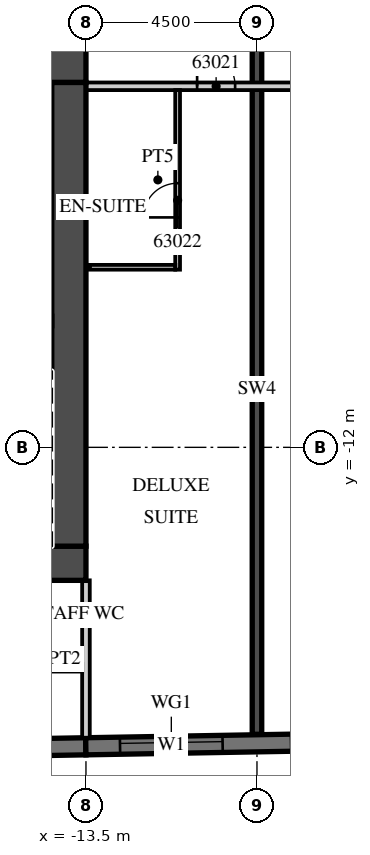
"""IFC4 building model, lengths in metres.
Left out: names, types, materials, properties, quantities, classifications, styles, units other than length and angle.
Written with IfcOpenShell. Run it as: python <this file> out.ifc"""

import sys

from ifc_helpers import new_model, si_unit, direction, frame, frame_2d, origin, place, context, subcontext, project, spatial, rectangle, extrude, element, fill, save


model = new_model("IFC4")
c1 = context("Model", 3, precision=1e-05, world=origin(), true_north=direction((0.0, 1.0)))
c2 = subcontext(c1, "Body", "Model", "MODEL_VIEW")
j1 = project(units=[si_unit("LENGTHUNIT", "METRE"), si_unit("PLANEANGLEUNIT", "RADIAN")], contexts=[c1])
p1 = place(None, origin())
s1 = spatial("IfcSite", under=j1, at=p1, CompositionType="ELEMENT")
p2 = place(p1, origin())
s2 = spatial("IfcBuilding", under=s1, at=p2, CompositionType="ELEMENT")
p3 = place(p2, frame((0.0, 0.0, 254.0)))
s3 = spatial("IfcBuildingStorey", under=s2, at=p3, CompositionType="ELEMENT", Elevation=254.0)
p4 = place(p3, frame((-9.0, -19.55, 0.0), z_axis=(0.0, 0.0, 1.0), x_axis=(0.0, 1.0, 0.0)))
e1 = element("IfcWall", 1, at=p4, inside=s3, PredefinedType="SHEAR", context=c2, shape_type="SweptSolid", body=[
    extrude(rectangle(XDim=18.15, YDim=0.25, at=frame_2d((9.075, 0.0))), origin(), (0.0, 0.0, 1.0), 3.0),
])
p5 = place(p3, frame((-31.504, -20.18, 0.0), z_axis=(0.0, 0.0, 1.0), x_axis=(0.999847677887, 0.017453395744, 0.0)))
e2 = element("IfcWall", 2, at=p5, inside=s3, PredefinedType="SOLIDWALL", context=c2, shape_type="SweptSolid", body=[
    extrude(rectangle(XDim=18.003, YDim=0.45, at=frame_2d((9.001, 0.0))), origin(), (0.0, 0.0, 1.0), 3.0),
])
p6 = place(p3, frame((-13.504, -19.866, 0.0), z_axis=(0.0, 0.0, 1.0), x_axis=(0.999847672978, 0.017453676992, 0.0)))
e3 = element("IfcWall", 3, at=p6, inside=s3, PredefinedType="SOLIDWALL", context=c2, shape_type="SweptSolid", body=[
    extrude(rectangle(XDim=52.86, YDim=0.45, at=frame_2d((26.43, 0.0))), origin(), (0.0, 0.0, 1.0), 3.0),
])
p7 = place(p6, frame((0.9, 0.0, 0.45)))
e4 = element("IfcOpeningElement", 4, at=p7, cuts=e3, PredefinedType="OPENING", context=c2, shape_type="SweptSolid", body=[
    extrude(rectangle(XDim=2.7, YDim=2.25, at=frame_2d((1.35, 1.125))), frame((0.0, 0.235, 0.0), z_axis=(0.0, -1.0, 0.0), x_axis=(1.0, 0.0, 0.0)), (0.0, 0.0, 1.0), 0.47),
])
p8 = place(p6, frame((5.401, 0.0, 0.45)))
e5 = element("IfcOpeningElement", 5, at=p8, cuts=e3, PredefinedType="OPENING", context=c2, shape_type="SweptSolid", body=[
    extrude(rectangle(XDim=2.7, YDim=2.25, at=frame_2d((1.35, 1.125))), frame((0.0, 0.235, 0.0), z_axis=(0.0, -1.0, 0.0), x_axis=(1.0, 0.0, 0.0)), (0.0, 0.0, 1.0), 0.47),
])
p9 = place(p6, frame((9.902, 0.0, 0.45)))
e6 = element("IfcOpeningElement", 6, at=p9, cuts=e3, PredefinedType="OPENING", context=c2, shape_type="SweptSolid", body=[
    extrude(rectangle(XDim=2.7, YDim=2.25, at=frame_2d((1.35, 1.125))), frame((0.0, 0.235, 0.0), z_axis=(0.0, -1.0, 0.0), x_axis=(1.0, 0.0, 0.0)), (0.0, 0.0, 1.0), 0.47),
])
p10 = place(p6, frame((14.402, 0.0, 0.45)))
e7 = element("IfcOpeningElement", 7, at=p10, cuts=e3, PredefinedType="OPENING", context=c2, shape_type="SweptSolid", body=[
    extrude(rectangle(XDim=2.7, YDim=2.25, at=frame_2d((1.35, 1.125))), frame((0.0, 0.235, 0.0), z_axis=(0.0, -1.0, 0.0), x_axis=(1.0, 0.0, 0.0)), (0.0, 0.0, 1.0), 0.47),
])
p11 = place(p6, frame((18.903, 0.0, 0.45)))
e8 = element("IfcOpeningElement", 8, at=p11, cuts=e3, PredefinedType="OPENING", context=c2, shape_type="SweptSolid", body=[
    extrude(rectangle(XDim=2.7, YDim=2.25, at=frame_2d((1.35, 1.125))), frame((0.0, 0.235, 0.0), z_axis=(0.0, -1.0, 0.0), x_axis=(1.0, 0.0, 0.0)), (0.0, 0.0, 1.0), 0.47),
])
p12 = place(p6, frame((23.404, 0.0, 0.45)))
e9 = element("IfcOpeningElement", 9, at=p12, cuts=e3, PredefinedType="OPENING", context=c2, shape_type="SweptSolid", body=[
    extrude(rectangle(XDim=2.7, YDim=2.25, at=frame_2d((1.35, 1.125))), frame((0.0, 0.235, 0.0), z_axis=(0.0, -1.0, 0.0), x_axis=(1.0, 0.0, 0.0)), (0.0, 0.0, 1.0), 0.47),
])
p13 = place(p6, frame((27.904, 0.0, 0.45)))
e10 = element("IfcOpeningElement", 10, at=p13, cuts=e3, PredefinedType="OPENING", context=c2, shape_type="SweptSolid", body=[
    extrude(rectangle(XDim=2.7, YDim=2.25, at=frame_2d((1.35, 1.125))), frame((0.0, 0.235, 0.0), z_axis=(0.0, -1.0, 0.0), x_axis=(1.0, 0.0, 0.0)), (0.0, 0.0, 1.0), 0.47),
])
p14 = place(p6, frame((32.405, 0.0, 0.45)))
e11 = element("IfcOpeningElement", 11, at=p14, cuts=e3, PredefinedType="OPENING", context=c2, shape_type="SweptSolid", body=[
    extrude(rectangle(XDim=2.7, YDim=2.25, at=frame_2d((1.35, 1.125))), frame((0.0, 0.235, 0.0), z_axis=(0.0, -1.0, 0.0), x_axis=(1.0, 0.0, 0.0)), (0.0, 0.0, 1.0), 0.47),
])
p15 = place(p6, frame((36.906, 0.0, 0.45)))
e12 = element("IfcOpeningElement", 12, at=p15, cuts=e3, PredefinedType="OPENING", context=c2, shape_type="SweptSolid", body=[
    extrude(rectangle(XDim=2.7, YDim=2.25, at=frame_2d((1.35, 1.125))), frame((0.0, 0.235, 0.0), z_axis=(0.0, -1.0, 0.0), x_axis=(1.0, 0.0, 0.0)), (0.0, 0.0, 1.0), 0.47),
])
p16 = place(p6, frame((41.406, 0.0, 0.45)))
e13 = element("IfcOpeningElement", 13, at=p16, cuts=e3, PredefinedType="OPENING", context=c2, shape_type="SweptSolid", body=[
    extrude(rectangle(XDim=2.7, YDim=2.25, at=frame_2d((1.35, 1.125))), frame((0.0, 0.235, 0.0), z_axis=(0.0, -1.0, 0.0), x_axis=(1.0, 0.0, 0.0)), (0.0, 0.0, 1.0), 0.47),
])
p17 = place(p6, frame((45.907, 0.0, 0.45)))
e14 = element("IfcOpeningElement", 14, at=p17, cuts=e3, PredefinedType="OPENING", context=c2, shape_type="SweptSolid", body=[
    extrude(rectangle(XDim=2.7, YDim=2.25, at=frame_2d((1.35, 1.125))), frame((0.0, 0.235, 0.0), z_axis=(0.0, -1.0, 0.0), x_axis=(1.0, 0.0, 0.0)), (0.0, 0.0, 1.0), 0.47),
])
p18 = place(p3, frame((-13.5, -19.641, 0.0), z_axis=(0.0, 0.0, 1.0), x_axis=(0.0, 1.0, 0.0)))
e15 = element("IfcWall", 15, at=p18, inside=s3, PredefinedType="PARTITIONING", context=c2, shape_type="SweptSolid", body=[
    extrude(rectangle(XDim=4.141, YDim=0.2, at=frame_2d((2.071, 0.0))), origin(), (0.0, 0.0, 1.0), 3.0),
])
p19 = place(p3, frame((-13.5, -2.5, 0.0), z_axis=(0.0, 0.0, 1.0), x_axis=(1.0, 0.0, 0.0)))
e16 = element("IfcWall", 16, at=p19, inside=s3, PredefinedType="PARTITIONING", context=c2, shape_type="SweptSolid", body=[
    extrude(rectangle(XDim=27.0, YDim=0.2, at=frame_2d((13.5, 0.0))), origin(), (0.0, 0.0, 1.0), 3.0),
])
p20 = place(p19, frame((2.925, 0.0, 0.0)))
e17 = element("IfcOpeningElement", 17, at=p20, cuts=e16, PredefinedType="OPENING", context=c2, shape_type="SweptSolid", body=[
    extrude(rectangle(XDim=1.0, YDim=2.1, at=frame_2d((0.5, 1.05))), frame((0.0, 0.11, 0.0), z_axis=(0.0, -1.0, 0.0), x_axis=(1.0, 0.0, 0.0)), (0.0, 0.0, 1.0), 0.22),
])
p21 = place(p19, frame((6.938, 0.0, 0.0)))
e18 = element("IfcOpeningElement", 18, at=p21, cuts=e16, PredefinedType="OPENING", context=c2, shape_type="SweptSolid", body=[
    extrude(rectangle(XDim=1.2, YDim=2.1, at=frame_2d((0.6, 1.05))), frame((0.0, 0.11, 0.0), z_axis=(0.0, -1.0, 0.0), x_axis=(1.0, 0.0, 0.0)), (0.0, 0.0, 1.0), 0.22),
])
p22 = place(p19, frame((18.862, 0.0, 0.0)))
e19 = element("IfcOpeningElement", 19, at=p22, cuts=e16, PredefinedType="OPENING", context=c2, shape_type="SweptSolid", body=[
    extrude(rectangle(XDim=1.2, YDim=2.1, at=frame_2d((0.6, 1.05))), frame((0.0, 0.11, 0.0), z_axis=(0.0, -1.0, 0.0), x_axis=(1.0, 0.0, 0.0)), (0.0, 0.0, 1.0), 0.22),
])
p23 = place(p19, frame((23.075, 0.0, 0.0)))
e20 = element("IfcOpeningElement", 20, at=p23, cuts=e16, PredefinedType="OPENING", context=c2, shape_type="SweptSolid", body=[
    extrude(rectangle(XDim=1.0, YDim=2.1, at=frame_2d((0.5, 1.05))), frame((0.0, 0.11, 0.0), z_axis=(0.0, -1.0, 0.0), x_axis=(1.0, 0.0, 0.0)), (0.0, 0.0, 1.0), 0.22),
])
p24 = place(p3, frame((-11.088, -7.325, 0.0), z_axis=(0.0, 0.0, 1.0), x_axis=(0.0, 1.0, 0.0)))
e21 = element("IfcWall", 21, at=p24, inside=s3, PredefinedType="PARTITIONING", context=c2, shape_type="SweptSolid", body=[
    extrude(rectangle(XDim=4.725, YDim=0.125, at=frame_2d((2.362, 0.0))), origin(), (0.0, 0.0, 1.0), 3.0),
])
p25 = place(p24, frame((1.375, 0.0, 0.0)))
e22 = element("IfcOpeningElement", 22, at=p25, cuts=e21, PredefinedType="OPENING", context=c2, shape_type="SweptSolid", body=[
    extrude(rectangle(XDim=0.9, YDim=2.1, at=frame_2d((0.45, 1.05))), frame((0.0, 0.073, 0.0), z_axis=(0.0, -1.0, 0.0), x_axis=(1.0, 0.0, 0.0)), (0.0, 0.0, 1.0), 0.145),
])
p26 = place(p3, frame((-13.4, -7.262, 0.0), z_axis=(0.0, 0.0, 1.0), x_axis=(1.0, 0.0, 0.0)))
e23 = element("IfcWall", 23, at=p26, inside=s3, PredefinedType="PARTITIONING", context=c2, shape_type="SweptSolid", body=[
    extrude(rectangle(XDim=2.25, YDim=0.125, at=frame_2d((1.125, 0.0))), origin(), (0.0, 0.0, 1.0), 3.0),
])
p27 = place(p3, frame((-31.5, -1.95, 0.0), z_axis=(0.0, 0.0, 1.0), x_axis=(1.0, 0.0, 0.0)))
e24 = element("IfcWall", 24, at=p27, inside=s3, PredefinedType="SHEAR", context=c2, shape_type="SweptSolid", body=[
    extrude(rectangle(XDim=18.0, YDim=0.9, at=frame_2d((9.0, 0.0))), origin(), (0.0, 0.0, 1.0), 3.0),
])
p28 = place(p27, frame((14.725, 0.0, 0.0)))
e25 = element("IfcOpeningElement", 25, at=p28, cuts=e24, PredefinedType="OPENING", context=c2, shape_type="SweptSolid", body=[
    extrude(rectangle(XDim=1.8, YDim=2.1, at=frame_2d((0.9, 1.05))), frame((0.0, 0.46, 0.0), z_axis=(0.0, -1.0, 0.0), x_axis=(1.0, 0.0, 0.0)), (0.0, 0.0, 1.0), 0.92),
])
p29 = place(p3, frame((-20.3, -15.05, 0.0), z_axis=(0.0, 0.0, 1.0), x_axis=(1.0, 0.0, 0.0)))
e26 = element("IfcWall", 26, at=p29, inside=s3, PredefinedType="SHEAR", context=c2, shape_type="SweptSolid", body=[
    extrude(rectangle(XDim=6.8, YDim=0.9, at=frame_2d((3.4, 0.0))), origin(), (0.0, 0.0, 1.0), 3.0),
])
p30 = place(p29, frame((0.875, 0.0, 0.0)))
e27 = element("IfcOpeningElement", 27, at=p30, cuts=e26, PredefinedType="OPENING", context=c2, shape_type="SweptSolid", body=[
    extrude(rectangle(XDim=1.2, YDim=2.1, at=frame_2d((0.6, 1.05))), frame((0.0, 0.46, 0.0), z_axis=(0.0, -1.0, 0.0), x_axis=(1.0, 0.0, 0.0)), (0.0, 0.0, 1.0), 0.92),
])
p31 = place(p3, frame((-13.95, -14.6, 0.0), z_axis=(0.0, 0.0, 1.0), x_axis=(0.0, 1.0, 0.0)))
e28 = element("IfcWall", 28, at=p31, inside=s3, PredefinedType="SHEAR", context=c2, shape_type="SweptSolid", body=[
    extrude(rectangle(XDim=12.2, YDim=0.9, at=frame_2d((6.1, 0.0))), origin(), (0.0, 0.0, 1.0), 3.0),
])
p32 = place(p3, frame((-35.864, -17.8, 0.0), z_axis=(0.0, 0.0, 1.0), x_axis=(1.0, 0.0, 0.0)))
e29 = element("IfcWall", 29, at=p32, inside=s3, PredefinedType="PARTITIONING", context=c2, shape_type="SweptSolid", body=[
    extrude(rectangle(XDim=22.264, YDim=0.2, at=frame_2d((11.132, 0.0))), origin(), (0.0, 0.0, 1.0), 3.0),
])
p33 = place(p32, frame((6.351, 0.0, 0.0)))
e30 = element("IfcOpeningElement", 30, at=p33, cuts=e29, PredefinedType="OPENING", context=c2, shape_type="SweptSolid", body=[
    extrude(rectangle(XDim=0.9, YDim=2.1, at=frame_2d((0.45, 1.05))), frame((0.0, 0.11, 0.0), z_axis=(0.0, -1.0, 0.0), x_axis=(1.0, 0.0, 0.0)), (0.0, 0.0, 1.0), 0.22),
])
p34 = place(p32, frame((14.651, 0.0, 0.0)))
e31 = element("IfcOpeningElement", 31, at=p34, cuts=e29, PredefinedType="OPENING", context=c2, shape_type="SweptSolid", body=[
    extrude(rectangle(XDim=0.9, YDim=2.1, at=frame_2d((0.45, 1.05))), frame((0.0, 0.11, 0.0), z_axis=(0.0, -1.0, 0.0), x_axis=(1.0, 0.0, 0.0)), (0.0, 0.0, 1.0), 0.22),
])
p35 = place(p7, origin())
e32 = element("IfcWindow", 32, at=p35, inside=s3, PartitioningType="SINGLE_PANEL", PredefinedType="WINDOW", context=c2, shape_type="SweptSolid", body=[
    extrude(rectangle(XDim=2.7, YDim=2.25, at=frame_2d((1.35, 1.125))), frame((0.0, 0.09, 0.0), z_axis=(0.0, -1.0, 0.0), x_axis=(1.0, 0.0, 0.0)), (0.0, 0.0, 1.0), 0.06),
])
fill(e4, e32)
p36 = place(p20, origin())
e33 = element("IfcDoor", 33, at=p36, inside=s3, OperationType="SINGLE_SWING_LEFT", PredefinedType="DOOR", context=c2, shape_type="SweptSolid", body=[
    extrude(rectangle(XDim=1.0, YDim=2.1, at=frame_2d((0.5, 1.05))), frame((0.0, 0.025, 0.0), z_axis=(0.0, -1.0, 0.0), x_axis=(1.0, 0.0, 0.0)), (0.0, 0.0, 1.0), 0.05),
])
fill(e17, e33)
p37 = place(p25, origin())
e34 = element("IfcDoor", 34, at=p37, inside=s3, OperationType="SINGLE_SWING_LEFT", PredefinedType="DOOR", context=c2, shape_type="SweptSolid", body=[
    extrude(rectangle(XDim=0.9, YDim=2.1, at=frame_2d((0.45, 1.05))), frame((0.0, 0.025, 0.0), z_axis=(0.0, -1.0, 0.0), x_axis=(1.0, 0.0, 0.0)), (0.0, 0.0, 1.0), 0.05),
])
fill(e22, e34)
save(model, sys.argv[1])
